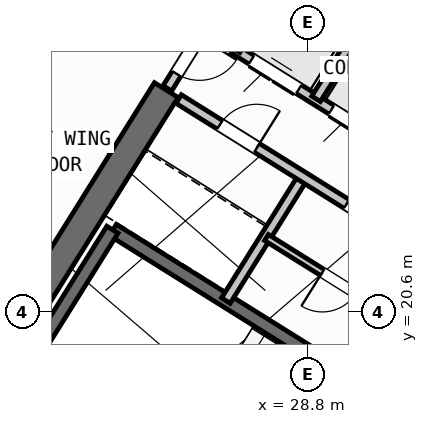
"""IFC4 building model, lengths in metres.
Left out: names, types, materials, properties, quantities, classifications, styles, units other than length and angle.
Written with IfcOpenShell. Run it as: python <this file> out.ifc"""

import sys

from ifc_helpers import new_model, si_unit, direction, frame, frame_2d, origin, place, context, subcontext, project, spatial, rectangle, extrude, source, transform, mapped, element, fill, save


model = new_model("IFC4")
c1 = context("Model", 3, precision=1e-05, world=origin(), true_north=direction((0.0, 1.0)))
c2 = subcontext(c1, "Body", "Model", "MODEL_VIEW")
j1 = project(units=[si_unit("LENGTHUNIT", "METRE"), si_unit("PLANEANGLEUNIT", "RADIAN")], contexts=[c1])
p1 = place(None, origin())
s1 = spatial("IfcSite", under=j1, at=p1, CompositionType="ELEMENT")
p2 = place(p1, origin())
s2 = spatial("IfcBuilding", under=s1, at=p2, CompositionType="ELEMENT")
p3 = place(p2, frame((0.0, 0.0, 147.9)))
s3 = spatial("IfcBuildingStorey", under=s2, at=p3, CompositionType="ELEMENT", Elevation=147.9)
p4 = place(p3, frame((40.573, 24.01, 0.0), z_axis=(0.0, 0.0, 1.0), x_axis=(-0.848047359947, 0.529920442413, 0.0)))
e1 = element("IfcWall", 1, at=p4, inside=s3, PredefinedType="SHEAR", context=c2, shape_type="SweptSolid", body=[
    extrude(rectangle(XDim=13.14, YDim=0.55, at=frame_2d((6.57, 0.0))), origin(), (0.0, 0.0, 1.0), 3.35),
])
p5 = place(p3, frame((26.007, 24.976, 0.0), z_axis=(0.0, 0.0, 1.0), x_axis=(-0.529923795287, -0.848045264823, 0.0)))
e2 = element("IfcWall", 2, at=p5, inside=s3, PredefinedType="SHEAR", context=c2, shape_type="SweptSolid", body=[
    extrude(rectangle(XDim=6.425, YDim=0.55, at=frame_2d((3.212, 0.0))), origin(), (0.0, 0.0, 1.0), 3.35),
])
p6 = place(p3, frame((29.268, 6.429, 0.0), z_axis=(0.0, 0.0, 1.0), x_axis=(-0.848049971435, 0.529916263149, 0.0)))
e3 = element("IfcWall", 3, at=p6, inside=s3, PredefinedType="STANDARD", context=c2, shape_type="SweptSolid", body=[
    extrude(rectangle(XDim=31.588, YDim=0.32, at=frame_2d((15.794, 0.0))), origin(), (0.0, 0.0, 1.0), 3.35),
])
p7 = place(p6, frame((16.362, 0.0, 0.0)))
e4 = element("IfcOpeningElement", 4, at=p7, cuts=e3, PredefinedType="OPENING", context=c2, shape_type="SweptSolid", body=[
    extrude(rectangle(XDim=1.2, YDim=2.15, at=frame_2d((0.6, 1.075))), frame((0.0, 0.17, 0.0), z_axis=(0.0, -1.0, 0.0), x_axis=(1.0, 0.0, 0.0)), (0.0, 0.0, 1.0), 0.34),
])
p8 = place(p6, frame((2.989, 0.0, 0.8)))
e5 = element("IfcOpeningElement", 5, at=p8, cuts=e3, PredefinedType="OPENING", context=c2, shape_type="SweptSolid", body=[
    extrude(rectangle(XDim=2.1, YDim=1.55, at=frame_2d((1.05, 0.775))), frame((0.0, 0.17, 0.0), z_axis=(0.0, -1.0, 0.0), x_axis=(1.0, 0.0, 0.0)), (0.0, 0.0, 1.0), 0.34),
])
p9 = place(p6, frame((8.359, 0.0, 0.8)))
e6 = element("IfcOpeningElement", 6, at=p9, cuts=e3, PredefinedType="OPENING", context=c2, shape_type="SweptSolid", body=[
    extrude(rectangle(XDim=2.1, YDim=1.55, at=frame_2d((1.05, 0.775))), frame((0.0, 0.17, 0.0), z_axis=(0.0, -1.0, 0.0), x_axis=(1.0, 0.0, 0.0)), (0.0, 0.0, 1.0), 0.34),
])
p10 = place(p6, frame((13.284, 0.0, 0.95)))
e7 = element("IfcOpeningElement", 7, at=p10, cuts=e3, PredefinedType="OPENING", context=c2, shape_type="SweptSolid", body=[
    extrude(rectangle(XDim=1.2, YDim=1.4, at=frame_2d((0.6, 0.7))), frame((0.0, 0.17, 0.0), z_axis=(0.0, -1.0, 0.0), x_axis=(1.0, 0.0, 0.0)), (0.0, 0.0, 1.0), 0.34),
])
p11 = place(p6, frame((29.188, 0.0, 0.95)))
e8 = element("IfcOpeningElement", 8, at=p11, cuts=e3, PredefinedType="OPENING", context=c2, shape_type="SweptSolid", body=[
    extrude(rectangle(XDim=1.2, YDim=1.4, at=frame_2d((0.6, 0.7))), frame((0.0, 0.17, 0.0), z_axis=(0.0, -1.0, 0.0), x_axis=(1.0, 0.0, 0.0)), (0.0, 0.0, 1.0), 0.34),
])
p12 = place(p6, frame((19.674, 0.0, 1.0)))
e9 = element("IfcOpeningElement", 9, at=p12, cuts=e3, PredefinedType="OPENING", context=c2, shape_type="SweptSolid", body=[
    extrude(rectangle(XDim=0.9, YDim=1.25, at=frame_2d((0.45, 0.625))), frame((0.0, 0.17, 0.0), z_axis=(0.0, -1.0, 0.0), x_axis=(1.0, 0.0, 0.0)), (0.0, 0.0, 1.0), 0.34),
])
p13 = place(p6, frame((21.896, 0.0, 1.0)))
e10 = element("IfcOpeningElement", 10, at=p13, cuts=e3, PredefinedType="OPENING", context=c2, shape_type="SweptSolid", body=[
    extrude(rectangle(XDim=0.9, YDim=1.25, at=frame_2d((0.45, 0.625))), frame((0.0, 0.17, 0.0), z_axis=(0.0, -1.0, 0.0), x_axis=(1.0, 0.0, 0.0)), (0.0, 0.0, 1.0), 0.34),
])
p14 = place(p6, frame((24.106, 0.0, 1.0)))
e11 = element("IfcOpeningElement", 11, at=p14, cuts=e3, PredefinedType="OPENING", context=c2, shape_type="SweptSolid", body=[
    extrude(rectangle(XDim=0.65, YDim=1.15, at=frame_2d((0.325, 0.575))), frame((0.0, 0.17, 0.0), z_axis=(0.0, -1.0, 0.0), x_axis=(1.0, 0.0, 0.0)), (0.0, 0.0, 1.0), 0.34),
])
p15 = place(p6, frame((26.366, 0.0, 1.0)))
e12 = element("IfcOpeningElement", 12, at=p15, cuts=e3, PredefinedType="OPENING", context=c2, shape_type="SweptSolid", body=[
    extrude(rectangle(XDim=0.9, YDim=1.25, at=frame_2d((0.45, 0.625))), frame((0.0, 0.17, 0.0), z_axis=(0.0, -1.0, 0.0), x_axis=(1.0, 0.0, 0.0)), (0.0, 0.0, 1.0), 0.34),
])
p16 = place(p3, frame((14.138, 41.825, 0.0), z_axis=(0.0, 0.0, 1.0), x_axis=(0.848046498049, -0.529921821731, 0.0)))
e13 = element("IfcWall", 13, at=p16, inside=s3, PredefinedType="STANDARD", context=c2, shape_type="SweptSolid", body=[
    extrude(rectangle(XDim=31.588, YDim=0.32, at=frame_2d((15.794, 0.0))), origin(), (0.0, 0.0, 1.0), 3.35),
])
p17 = place(p16, frame((2.949, 0.0, 0.0)))
e14 = element("IfcOpeningElement", 14, at=p17, cuts=e13, PredefinedType="OPENING", context=c2, shape_type="SweptSolid", body=[
    extrude(rectangle(XDim=1.05, YDim=2.15, at=frame_2d((0.525, 1.075))), frame((0.0, 0.17, 0.0), z_axis=(0.0, -1.0, 0.0), x_axis=(1.0, 0.0, 0.0)), (0.0, 0.0, 1.0), 0.34),
])
p18 = place(p16, frame((0.861, 0.0, 0.85)))
e15 = element("IfcOpeningElement", 15, at=p18, cuts=e13, PredefinedType="OPENING", context=c2, shape_type="SweptSolid", body=[
    extrude(rectangle(XDim=1.5, YDim=1.5, at=frame_2d((0.75, 0.75))), frame((0.0, 0.17, 0.0), z_axis=(0.0, -1.0, 0.0), x_axis=(1.0, 0.0, 0.0)), (0.0, 0.0, 1.0), 0.34),
])
p19 = place(p16, frame((8.494, 0.0, 0.85)))
e16 = element("IfcOpeningElement", 16, at=p19, cuts=e13, PredefinedType="OPENING", context=c2, shape_type="SweptSolid", body=[
    extrude(rectangle(XDim=1.8, YDim=1.5, at=frame_2d((0.9, 0.75))), frame((0.0, 0.17, 0.0), z_axis=(0.0, -1.0, 0.0), x_axis=(1.0, 0.0, 0.0)), (0.0, 0.0, 1.0), 0.34),
])
p20 = place(p16, frame((13.874, 0.0, 0.85)))
e17 = element("IfcOpeningElement", 17, at=p20, cuts=e13, PredefinedType="OPENING", context=c2, shape_type="SweptSolid", body=[
    extrude(rectangle(XDim=1.5, YDim=1.5, at=frame_2d((0.75, 0.75))), frame((0.0, 0.17, 0.0), z_axis=(0.0, -1.0, 0.0), x_axis=(1.0, 0.0, 0.0)), (0.0, 0.0, 1.0), 0.34),
])
p21 = place(p16, frame((17.104, 0.0, 1.0)))
e18 = element("IfcOpeningElement", 18, at=p21, cuts=e13, PredefinedType="OPENING", context=c2, shape_type="SweptSolid", body=[
    extrude(rectangle(XDim=0.9, YDim=1.25, at=frame_2d((0.45, 0.625))), frame((0.0, 0.17, 0.0), z_axis=(0.0, -1.0, 0.0), x_axis=(1.0, 0.0, 0.0)), (0.0, 0.0, 1.0), 0.34),
])
p22 = place(p16, frame((22.144, 0.0, 1.0)))
e19 = element("IfcOpeningElement", 19, at=p22, cuts=e13, PredefinedType="OPENING", context=c2, shape_type="SweptSolid", body=[
    extrude(rectangle(XDim=0.9, YDim=1.25, at=frame_2d((0.45, 0.625))), frame((0.0, 0.17, 0.0), z_axis=(0.0, -1.0, 0.0), x_axis=(1.0, 0.0, 0.0)), (0.0, 0.0, 1.0), 0.34),
])
p23 = place(p16, frame((27.744, 0.0, 1.0)))
e20 = element("IfcOpeningElement", 20, at=p23, cuts=e13, PredefinedType="OPENING", context=c2, shape_type="SweptSolid", body=[
    extrude(rectangle(XDim=0.9, YDim=1.25, at=frame_2d((0.45, 0.625))), frame((0.0, 0.17, 0.0), z_axis=(0.0, -1.0, 0.0), x_axis=(1.0, 0.0, 0.0)), (0.0, 0.0, 1.0), 0.34),
])
p24 = place(p3, frame((31.28, 18.261, 0.0), z_axis=(0.0, 0.0, 1.0), x_axis=(-0.848051618787, 0.529913626805, 0.0)))
e21 = element("IfcWall", 21, at=p24, inside=s3, PredefinedType="SHEAR", context=c2, shape_type="SweptSolid", body=[
    extrude(rectangle(XDim=7.46, YDim=0.26, at=frame_2d((3.73, 0.0))), origin(), (0.0, 0.0, 1.0), 3.35),
])
p25 = place(p24, frame((0.36, 0.0, 0.0)))
e22 = element("IfcOpeningElement", 22, at=p25, cuts=e21, PredefinedType="OPENING", context=c2, shape_type="SweptSolid", body=[
    extrude(rectangle(XDim=0.86, YDim=2.05, at=frame_2d((0.43, 1.025))), frame((0.0, 0.14, 0.0), z_axis=(0.0, -1.0, 0.0), x_axis=(1.0, 0.0, 0.0)), (0.0, 0.0, 1.0), 0.28),
])
p26 = place(p3, frame((24.945, 22.22, 0.0), z_axis=(0.0, 0.0, 1.0), x_axis=(-0.529908658664, -0.84805472316, 0.0)))
e23 = element("IfcWall", 23, at=p26, inside=s3, PredefinedType="SHEAR", context=c2, shape_type="SweptSolid", body=[
    extrude(rectangle(XDim=3.16, YDim=0.26, at=frame_2d((1.58, 0.0))), origin(), (0.0, 0.0, 1.0), 3.35),
])
p27 = place(p3, frame((31.822, 24.998, 0.0), z_axis=(0.0, 0.0, 1.0), x_axis=(-0.848036912365, 0.52993716162, 0.0)))
e24 = element("IfcWall", 24, at=p27, inside=s3, PredefinedType="STANDARD", context=c2, shape_type="SweptSolid", body=[
    extrude(rectangle(XDim=4.618, YDim=0.2, at=frame_2d((2.309, 0.0))), origin(), (0.0, 0.0, 1.0), 3.34),
])
p28 = place(p3, frame((32.108, 22.814, 0.0), z_axis=(0.0, 0.0, 1.0), x_axis=(-0.848042229521, 0.529928652696, 0.0)))
e25 = element("IfcWall", 25, at=p28, inside=s3, PredefinedType="STANDARD", context=c2, shape_type="SweptSolid", body=[
    extrude(rectangle(XDim=5.62, YDim=0.2, at=frame_2d((2.81, 0.0))), origin(), (0.0, 0.0, 1.0), 3.34),
])
p29 = place(p28, frame((0.39, 0.0, 0.0)))
e26 = element("IfcOpeningElement", 26, at=p29, cuts=e25, PredefinedType="OPENING", context=c2, shape_type="SweptSolid", body=[
    extrude(rectangle(XDim=1.1, YDim=2.15, at=frame_2d((0.55, 1.075))), frame((0.0, 0.11, 0.0), z_axis=(0.0, -1.0, 0.0), x_axis=(1.0, 0.0, 0.0)), (0.0, 0.0, 1.0), 0.22),
])
p30 = place(p28, frame((2.25, 0.0, 0.0)))
e27 = element("IfcOpeningElement", 27, at=p30, cuts=e25, PredefinedType="OPENING", context=c2, shape_type="SweptSolid", body=[
    extrude(rectangle(XDim=1.1, YDim=2.15, at=frame_2d((0.55, 1.075))), frame((0.0, 0.11, 0.0), z_axis=(0.0, -1.0, 0.0), x_axis=(1.0, 0.0, 0.0)), (0.0, 0.0, 1.0), 0.22),
])
p31 = place(p28, frame((4.11, 0.0, 0.0)))
e28 = element("IfcOpeningElement", 28, at=p31, cuts=e25, PredefinedType="OPENING", context=c2, shape_type="SweptSolid", body=[
    extrude(rectangle(XDim=1.1, YDim=2.15, at=frame_2d((0.55, 1.075))), frame((0.0, 0.11, 0.0), z_axis=(0.0, -1.0, 0.0), x_axis=(1.0, 0.0, 0.0)), (0.0, 0.0, 1.0), 0.22),
])
p32 = place(p3, frame((28.25, 27.17, 0.0), z_axis=(0.0, 0.0, 1.0), x_axis=(-0.529905827651, -0.848056492117, 0.0)))
e29 = element("IfcWall", 29, at=p32, inside=s3, PredefinedType="STANDARD", context=c2, shape_type="SweptSolid", body=[
    extrude(rectangle(XDim=1.65, YDim=0.2, at=frame_2d((0.825, 0.0))), origin(), (0.0, 0.0, 1.0), 3.34),
])
p33 = place(p3, frame((29.801, 26.142, 0.0), z_axis=(0.0, 0.0, 1.0), x_axis=(-0.529998940003, -0.847998304005, 0.0)))
e30 = element("IfcWall", 30, at=p33, inside=s3, PredefinedType="STANDARD", context=c2, shape_type="SweptSolid", body=[
    extrude(rectangle(XDim=1.58, YDim=0.2, at=frame_2d((0.79, 0.0))), origin(), (0.0, 0.0, 1.0), 3.34),
])
p34 = place(p3, frame((28.71, 23.263, 0.0), z_axis=(0.0, 0.0, 1.0), x_axis=(-0.529907497854, -0.848055448493, 0.0)))
e31 = element("IfcWall", 31, at=p34, inside=s3, PredefinedType="STANDARD", context=c2, shape_type="SweptSolid", body=[
    extrude(rectangle(XDim=2.88, YDim=0.2, at=frame_2d((1.44, 0.0))), origin(), (0.0, 0.0, 1.0), 3.34),
])
p35 = place(p3, frame((31.525, 21.504, 0.0), z_axis=(0.0, 0.0, 1.0), x_axis=(-0.848040211232, 0.529931882541, 0.0)))
e32 = element("IfcWall", 32, at=p35, inside=s3, PredefinedType="STANDARD", context=c2, shape_type="SweptSolid", body=[
    extrude(rectangle(XDim=6.218, YDim=0.2, at=frame_2d((3.109, 0.0))), origin(), (0.0, 0.0, 1.0), 3.34),
])
p36 = place(p35, frame((4.4, 0.0, 0.0)))
e33 = element("IfcOpeningElement", 33, at=p36, cuts=e32, PredefinedType="OPENING", context=c2, shape_type="SweptSolid", body=[
    extrude(rectangle(XDim=0.86, YDim=2.05, at=frame_2d((0.43, 1.025))), frame((0.0, 0.11, 0.0), z_axis=(0.0, -1.0, 0.0), x_axis=(1.0, 0.0, 0.0)), (0.0, 0.0, 1.0), 0.22),
])
p37 = place(p35, frame((1.45, 0.0, 0.0)))
e34 = element("IfcOpeningElement", 34, at=p37, cuts=e32, PredefinedType="OPENING", context=c2, shape_type="SweptSolid", body=[
    extrude(rectangle(XDim=0.86, YDim=2.05, at=frame_2d((0.43, 1.025))), frame((0.0, 0.11, 0.0), z_axis=(0.0, -1.0, 0.0), x_axis=(1.0, 0.0, 0.0)), (0.0, 0.0, 1.0), 0.22),
])
p38 = place(p3, frame((30.766, 20.327, 0.0), z_axis=(0.0, 0.0, 1.0), x_axis=(-0.848052663127, 0.529911955482, 0.0)))
e35 = element("IfcWall", 35, at=p38, inside=s3, PredefinedType="PLUMBINGWALL", context=c2, shape_type="SweptSolid", body=[
    extrude(rectangle(XDim=3.28, YDim=0.14, at=frame_2d((1.64, 0.0))), origin(), (0.0, 0.0, 1.0), 3.34),
])
p39 = place(p38, frame((1.2, 0.0, 0.0)))
e36 = element("IfcOpeningElement", 36, at=p39, cuts=e35, PredefinedType="OPENING", context=c2, shape_type="SweptSolid", body=[
    extrude(rectangle(XDim=0.78, YDim=2.05, at=frame_2d((0.39, 1.025))), frame((0.0, 0.08, 0.0), z_axis=(0.0, -1.0, 0.0), x_axis=(1.0, 0.0, 0.0)), (0.0, 0.0, 1.0), 0.16),
])
p40 = place(p3, frame((27.596, 27.52, 0.0), z_axis=(0.0, 0.0, 1.0), x_axis=(-0.529865479138, -0.848081702443, 0.0)))
e37 = element("IfcWall", 37, at=p40, inside=s3, PredefinedType="STANDARD", context=c2, shape_type="SweptSolid", body=[
    extrude(rectangle(XDim=2.96, YDim=0.2, at=frame_2d((1.48, 0.0))), origin(), (0.0, 0.0, 1.0), 3.34),
])
p41 = place(p40, frame((1.76, 0.0, 0.0)))
e38 = element("IfcOpeningElement", 38, at=p41, cuts=e37, PredefinedType="OPENING", context=c2, shape_type="SweptSolid", body=[
    extrude(rectangle(XDim=0.86, YDim=2.05, at=frame_2d((0.43, 1.025))), frame((0.0, 0.11, 0.0), z_axis=(0.0, -1.0, 0.0), x_axis=(1.0, 0.0, 0.0)), (0.0, 0.0, 1.0), 0.22),
])
p42 = place(p3, frame((27.953, 33.016, 0.0), z_axis=(0.0, 0.0, 1.0), x_axis=(-0.529903001606, -0.848058257957, 0.0)))
e39 = element("IfcWall", 39, at=p42, inside=s3, PredefinedType="PARTITIONING", context=c2, shape_type="SweptSolid", body=[
    extrude(rectangle(XDim=9.15, YDim=0.16, at=frame_2d((4.575, 0.0))), origin(), (0.0, 0.0, 1.0), 3.34),
])
m1 = source(origin(), c2, "Body", "SweptSolid", [
    extrude(rectangle(XDim=1.1, YDim=2.15, at=frame_2d((0.55, 1.075))), frame((0.0, 0.025, 0.0), z_axis=(0.0, -1.0, 0.0), x_axis=(1.0, 0.0, 0.0)), (0.0, 0.0, 1.0), 0.05),
])
p43 = place(p30, origin())
e40 = element("IfcDoor", 40, at=p43, inside=s3, OperationType="DOUBLE_DOOR_SLIDING", PredefinedType="DOOR", context=c2, shape_type="MappedRepresentation", body=[
    mapped(m1, transform((0.0, 0.0, 0.0), scale=1.0)),
])
fill(e27, e40)
p44 = place(p31, origin())
e41 = element("IfcDoor", 41, at=p44, inside=s3, OperationType="DOUBLE_DOOR_SLIDING", PredefinedType="DOOR", context=c2, shape_type="MappedRepresentation", body=[
    mapped(m1, transform((0.0, 0.0, 0.0), scale=1.0)),
])
fill(e28, e41)
m2 = source(origin(), c2, "Body", "SweptSolid", [
    extrude(rectangle(XDim=0.86, YDim=2.05, at=frame_2d((0.43, 1.025))), frame((0.0, 0.025, 0.0), z_axis=(0.0, -1.0, 0.0), x_axis=(1.0, 0.0, 0.0)), (0.0, 0.0, 1.0), 0.05),
])
p45 = place(p36, frame((0.86, 0.0, 0.0), z_axis=(0.0, 0.0, 1.0), x_axis=(-1.0, 0.0, 0.0)))
e42 = element("IfcDoor", 42, at=p45, inside=s3, OperationType="SINGLE_SWING_RIGHT", PredefinedType="DOOR", context=c2, shape_type="MappedRepresentation", body=[
    mapped(m2, transform((0.0, 0.0, 0.0), scale=1.0)),
])
fill(e33, e42)
p46 = place(p37, frame((0.86, 0.0, 0.0), z_axis=(0.0, 0.0, 1.0), x_axis=(-1.0, 0.0, 0.0)))
e43 = element("IfcDoor", 43, at=p46, inside=s3, OperationType="SINGLE_SWING_LEFT", PredefinedType="DOOR", context=c2, shape_type="MappedRepresentation", body=[
    mapped(m2, transform((0.0, 0.0, 0.0), scale=1.0)),
])
fill(e34, e43)
m3 = source(origin(), c2, "Body", "SweptSolid", [
    extrude(rectangle(XDim=0.78, YDim=2.05, at=frame_2d((0.39, 1.025))), frame((0.0, 0.025, 0.0), z_axis=(0.0, -1.0, 0.0), x_axis=(1.0, 0.0, 0.0)), (0.0, 0.0, 1.0), 0.05),
])
p47 = place(p39, origin())
e44 = element("IfcDoor", 44, at=p47, inside=s3, OperationType="SINGLE_SWING_RIGHT", PredefinedType="DOOR", context=c2, shape_type="MappedRepresentation", body=[
    mapped(m3, transform((0.0, 0.0, 0.0), scale=1.0)),
])
fill(e36, e44)
p48 = place(p41, origin())
e45 = element("IfcDoor", 45, at=p48, inside=s3, OperationType="SINGLE_SWING_LEFT", PredefinedType="DOOR", context=c2, shape_type="MappedRepresentation", body=[
    mapped(m2, transform((0.0, 0.0, 0.0), scale=1.0)),
])
fill(e38, e45)
save(model, sys.argv[1])
